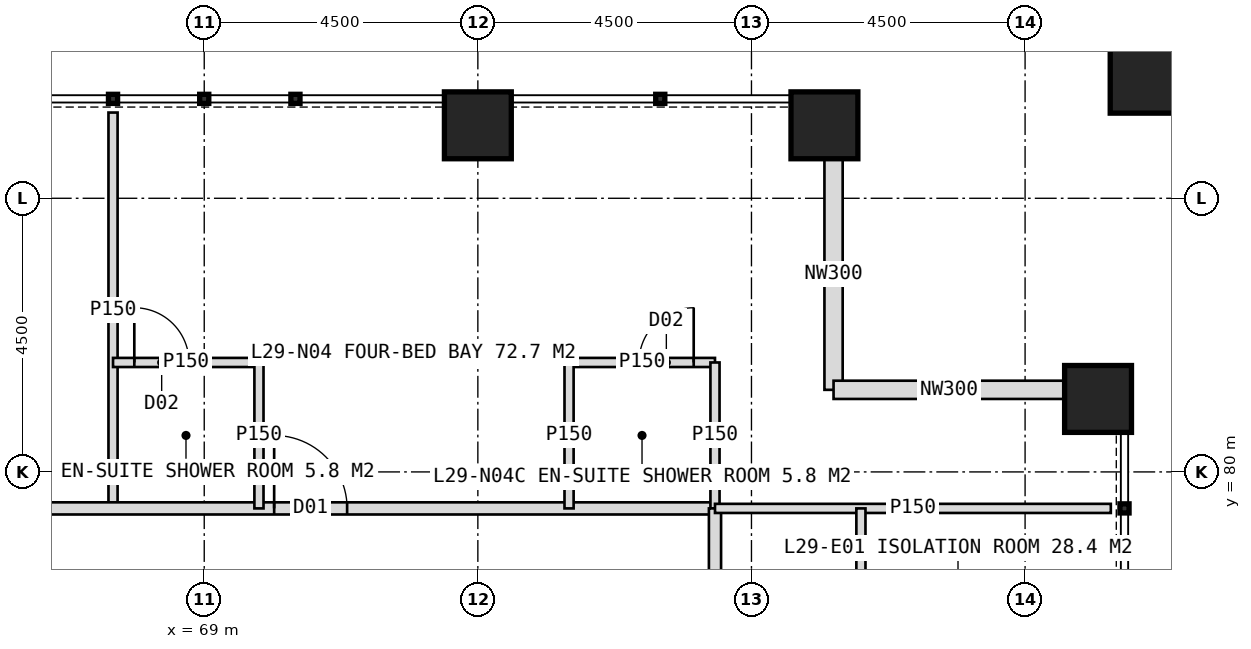
"""IFC4 building model, lengths in metres.
Left out: names, types, materials, properties, quantities, classifications, styles, units other than length and angle.
Written with IfcOpenShell. Run it as: python <this file> out.ifc"""

import sys

from ifc_helpers import new_model, si_unit, direction, frame, frame_2d, origin, origin_2d, place, context, subcontext, project, spatial, rectangle, hollow_rectangle, extrude, element, fill, save


model = new_model("IFC4")
c1 = context("Model", 3, precision=1e-05, world=origin(), true_north=direction((0.0, 1.0)))
c2 = subcontext(c1, "Body", "Model", "MODEL_VIEW")
j1 = project(units=[si_unit("LENGTHUNIT", "METRE"), si_unit("PLANEANGLEUNIT", "RADIAN")], contexts=[c1])
p1 = place(None, origin())
s1 = spatial("IfcSite", under=j1, at=p1, CompositionType="ELEMENT")
p2 = place(p1, origin())
s2 = spatial("IfcBuilding", under=s1, at=p2, CompositionType="ELEMENT")
p3 = place(p2, frame((0.0, 0.0, 124.0)))
s3 = spatial("IfcBuildingStorey", under=s2, at=p3, CompositionType="ELEMENT", Elevation=124.0)
for number, where, z_axis, x_axis in (
    (1, (73.5, 85.7, 0.0), (0.0, 0.0, 1.0), (1.0, 0.0, 0.0)),
    (2, (79.2, 85.7, 0.0), (0.0, 0.0, 1.0), (1.0, 0.0, 0.0)),
    (3, (83.7, 81.2, 0.0), (0.0, 0.0, 1.0), (1.0, 0.0, 0.0)),
):
    element("IfcColumn", number, at=place(p3, frame(where, z_axis=z_axis, x_axis=x_axis)), inside=s3, PredefinedType="COLUMN", context=c2, shape_type="SweptSolid", body=[
        extrude(hollow_rectangle(XDim=1.1, YDim=1.1, WallThickness=0.1, at=origin_2d()), origin(), (0.0, 0.0, 1.0), 4.0),
    ])
p4 = place(p3, frame((84.6, 86.6, 0.0), z_axis=(0.0, 0.0, 1.0), x_axis=(1.0, 0.0, 0.0)))
e4 = element("IfcColumn", 4, at=p4, inside=s3, PredefinedType="COLUMN", context=c2, shape_type="SweptSolid", body=[
    extrude(hollow_rectangle(XDim=1.4, YDim=1.4, WallThickness=0.08, at=origin_2d()), origin(), (0.0, 0.0, 1.0), 4.0),
])
for number, where, z_axis, x_axis in (
    (5, (79.35, 85.15, 0.0), (0.0, 0.0, 1.0), (0.0, -1.0, 0.0)),
    (6, (79.35, 81.35, 0.0), (0.0, 0.0, 1.0), (1.0, 0.0, 0.0)),
):
    element("IfcWall", number, at=place(p3, frame(where, z_axis=z_axis, x_axis=x_axis)), inside=s3, PredefinedType="ELEMENTEDWALL", context=c2, shape_type="SweptSolid", body=[
        extrude(rectangle(XDim=3.8, YDim=0.3, at=frame_2d((1.9, 0.0))), origin(), (0.0, 0.0, 1.0), 4.0),
    ])
p5 = place(p3, frame((67.5, 79.4, 0.0), z_axis=(0.0, 0.0, 1.0), x_axis=(0.0, 1.0, 0.0)))
e7 = element("IfcWall", 7, at=p5, inside=s3, PredefinedType="PARTITIONING", context=c2, shape_type="SweptSolid", body=[
    extrude(rectangle(XDim=6.51, YDim=0.15, at=frame_2d((3.255, 0.0))), origin(), (0.0, 0.0, 1.0), 3.75),
])
p6 = place(p3, frame((42.6, 79.4, 0.0), z_axis=(0.0, 0.0, 1.0), x_axis=(1.0, 0.0, 0.0)))
e8 = element("IfcWall", 8, at=p6, inside=s3, PredefinedType="PARTITIONING", context=c2, shape_type="SweptSolid", body=[
    extrude(rectangle(XDim=34.8, YDim=0.2, at=frame_2d((17.4, 0.0))), origin(), (0.0, 0.0, 1.0), 3.75),
])
p7 = place(p6, frame((2.45, 0.0, 0.0)))
e9 = element("IfcOpeningElement", 9, at=p7, cuts=e8, PredefinedType="OPENING", context=c2, shape_type="SweptSolid", body=[
    extrude(rectangle(XDim=1.2, YDim=2.2, at=frame_2d((0.6, 1.1))), frame((0.0, 0.11, 0.0), z_axis=(0.0, -1.0, 0.0), x_axis=(1.0, 0.0, 0.0)), (0.0, 0.0, 1.0), 0.22),
])
p8 = place(p6, frame((10.15, 0.0, 0.0)))
e10 = element("IfcOpeningElement", 10, at=p8, cuts=e8, PredefinedType="OPENING", context=c2, shape_type="SweptSolid", body=[
    extrude(rectangle(XDim=1.2, YDim=2.2, at=frame_2d((0.6, 1.1))), frame((0.0, 0.11, 0.0), z_axis=(0.0, -1.0, 0.0), x_axis=(1.0, 0.0, 0.0)), (0.0, 0.0, 1.0), 0.22),
])
p9 = place(p6, frame((19.8, 0.0, 0.0)))
e11 = element("IfcOpeningElement", 11, at=p9, cuts=e8, PredefinedType="OPENING", context=c2, shape_type="SweptSolid", body=[
    extrude(rectangle(XDim=1.2, YDim=2.2, at=frame_2d((0.6, 1.1))), frame((0.0, 0.11, 0.0), z_axis=(0.0, -1.0, 0.0), x_axis=(1.0, 0.0, 0.0)), (0.0, 0.0, 1.0), 0.22),
])
p10 = place(p6, frame((27.55, 0.0, 0.0)))
e12 = element("IfcOpeningElement", 12, at=p10, cuts=e8, PredefinedType="OPENING", context=c2, shape_type="SweptSolid", body=[
    extrude(rectangle(XDim=1.2, YDim=2.2, at=frame_2d((0.6, 1.1))), frame((0.0, 0.11, 0.0), z_axis=(0.0, -1.0, 0.0), x_axis=(1.0, 0.0, 0.0)), (0.0, 0.0, 1.0), 0.22),
])
p11 = place(p3, frame((67.5, 81.8, 0.0), z_axis=(0.0, 0.0, 1.0), x_axis=(1.0, 0.0, 0.0)))
e13 = element("IfcWall", 13, at=p11, inside=s3, PredefinedType="PARTITIONING", context=c2, shape_type="SweptSolid", body=[
    extrude(rectangle(XDim=2.4, YDim=0.15, at=frame_2d((1.2, 0.0))), origin(), (0.0, 0.0, 1.0), 3.75),
])
p12 = place(p11, frame((0.35, 0.0, 0.0)))
e14 = element("IfcOpeningElement", 14, at=p12, cuts=e13, PredefinedType="OPENING", context=c2, shape_type="SweptSolid", body=[
    extrude(rectangle(XDim=0.9, YDim=2.1, at=frame_2d((0.45, 1.05))), frame((0.0, 0.085, 0.0), z_axis=(0.0, -1.0, 0.0), x_axis=(1.0, 0.0, 0.0)), (0.0, 0.0, 1.0), 0.17),
])
p13 = place(p3, frame((69.9, 79.4, 0.0), z_axis=(0.0, 0.0, 1.0), x_axis=(0.0, 1.0, 0.0)))
e15 = element("IfcWall", 15, at=p13, inside=s3, PredefinedType="PARTITIONING", context=c2, shape_type="SweptSolid", body=[
    extrude(rectangle(XDim=2.4, YDim=0.15, at=frame_2d((1.2, 0.0))), origin(), (0.0, 0.0, 1.0), 3.75),
])
p14 = place(p3, frame((75.0, 81.8, 0.0), z_axis=(0.0, 0.0, 1.0), x_axis=(1.0, 0.0, 0.0)))
e16 = element("IfcWall", 16, at=p14, inside=s3, PredefinedType="PARTITIONING", context=c2, shape_type="SweptSolid", body=[
    extrude(rectangle(XDim=2.4, YDim=0.15, at=frame_2d((1.2, 0.0))), origin(), (0.0, 0.0, 1.0), 3.75),
])
p15 = place(p14, frame((1.15, 0.0, 0.0)))
e17 = element("IfcOpeningElement", 17, at=p15, cuts=e16, PredefinedType="OPENING", context=c2, shape_type="SweptSolid", body=[
    extrude(rectangle(XDim=0.9, YDim=2.1, at=frame_2d((0.45, 1.05))), frame((0.0, 0.085, 0.0), z_axis=(0.0, -1.0, 0.0), x_axis=(1.0, 0.0, 0.0)), (0.0, 0.0, 1.0), 0.17),
])
for number, where, z_axis, x_axis in (
    (18, (75.0, 79.4, 0.0), (0.0, 0.0, 1.0), (0.0, 1.0, 0.0)),
    (19, (77.4, 79.4, 0.0), (0.0, 0.0, 1.0), (0.0, 1.0, 0.0)),
):
    element("IfcWall", number, at=place(p3, frame(where, z_axis=z_axis, x_axis=x_axis)), inside=s3, PredefinedType="PARTITIONING", context=c2, shape_type="SweptSolid", body=[
        extrude(rectangle(XDim=2.4, YDim=0.15, at=frame_2d((1.2, 0.0))), origin(), (0.0, 0.0, 1.0), 3.75),
    ])
p16 = place(p3, frame((77.4, 79.4, 0.0), z_axis=(0.0, 0.0, 1.0), x_axis=(0.0, -1.0, 0.0)))
e20 = element("IfcWall", 20, at=p16, inside=s3, PredefinedType="PARTITIONING", context=c2, shape_type="SweptSolid", body=[
    extrude(rectangle(XDim=34.8, YDim=0.2, at=frame_2d((17.4, 0.0))), origin(), (0.0, 0.0, 1.0), 3.75),
])
p17 = place(p16, frame((2.45, 0.0, 0.0)))
e21 = element("IfcOpeningElement", 21, at=p17, cuts=e20, PredefinedType="OPENING", context=c2, shape_type="SweptSolid", body=[
    extrude(rectangle(XDim=1.2, YDim=2.2, at=frame_2d((0.6, 1.1))), frame((0.0, 0.11, 0.0), z_axis=(0.0, -1.0, 0.0), x_axis=(1.0, 0.0, 0.0)), (0.0, 0.0, 1.0), 0.22),
])
p18 = place(p16, frame((10.15, 0.0, 0.0)))
e22 = element("IfcOpeningElement", 22, at=p18, cuts=e20, PredefinedType="OPENING", context=c2, shape_type="SweptSolid", body=[
    extrude(rectangle(XDim=1.2, YDim=2.2, at=frame_2d((0.6, 1.1))), frame((0.0, 0.11, 0.0), z_axis=(0.0, -1.0, 0.0), x_axis=(1.0, 0.0, 0.0)), (0.0, 0.0, 1.0), 0.22),
])
p19 = place(p16, frame((19.55, 0.0, 0.0)))
e23 = element("IfcOpeningElement", 23, at=p19, cuts=e20, PredefinedType="OPENING", context=c2, shape_type="SweptSolid", body=[
    extrude(rectangle(XDim=1.2, YDim=2.2, at=frame_2d((0.6, 1.1))), frame((0.0, 0.11, 0.0), z_axis=(0.0, -1.0, 0.0), x_axis=(1.0, 0.0, 0.0)), (0.0, 0.0, 1.0), 0.22),
])
p20 = place(p16, frame((26.05, 0.0, 0.0)))
e24 = element("IfcOpeningElement", 24, at=p20, cuts=e20, PredefinedType="OPENING", context=c2, shape_type="SweptSolid", body=[
    extrude(rectangle(XDim=1.2, YDim=2.2, at=frame_2d((0.6, 1.1))), frame((0.0, 0.11, 0.0), z_axis=(0.0, -1.0, 0.0), x_axis=(1.0, 0.0, 0.0)), (0.0, 0.0, 1.0), 0.22),
])
p21 = place(p3, frame((77.4, 79.4, 0.0), z_axis=(0.0, 0.0, 1.0), x_axis=(1.0, 0.0, 0.0)))
e25 = element("IfcWall", 25, at=p21, inside=s3, PredefinedType="PARTITIONING", context=c2, shape_type="SweptSolid", body=[
    extrude(rectangle(XDim=6.51, YDim=0.15, at=frame_2d((3.255, 0.0))), origin(), (0.0, 0.0, 1.0), 3.75),
])
p22 = place(p3, frame((79.8, 79.4, 0.0), z_axis=(0.0, 0.0, 1.0), x_axis=(0.0, -1.0, 0.0)))
e26 = element("IfcWall", 26, at=p22, inside=s3, PredefinedType="PARTITIONING", context=c2, shape_type="SweptSolid", body=[
    extrude(rectangle(XDim=3.9, YDim=0.15, at=frame_2d((1.95, 0.0))), origin(), (0.0, 0.0, 1.0), 3.75),
])
p23 = place(p22, frame((2.45, 0.0, 0.0)))
e27 = element("IfcOpeningElement", 27, at=p23, cuts=e26, PredefinedType="OPENING", context=c2, shape_type="SweptSolid", body=[
    extrude(rectangle(XDim=1.2, YDim=2.2, at=frame_2d((0.6, 1.1))), frame((0.0, 0.085, 0.0), z_axis=(0.0, -1.0, 0.0), x_axis=(1.0, 0.0, 0.0)), (0.0, 0.0, 1.0), 0.17),
])
p24 = place(p10, origin())
e28 = element("IfcDoor", 28, at=p24, inside=s3, OperationType="SINGLE_SWING_LEFT", PredefinedType="DOOR", context=c2, shape_type="SweptSolid", body=[
    extrude(rectangle(XDim=1.2, YDim=2.2, at=frame_2d((0.6, 1.1))), frame((0.0, 0.025, 0.0), z_axis=(0.0, -1.0, 0.0), x_axis=(1.0, 0.0, 0.0)), (0.0, 0.0, 1.0), 0.05),
])
fill(e12, e28)
p25 = place(p12, origin())
e29 = element("IfcDoor", 29, at=p25, inside=s3, OperationType="SINGLE_SWING_LEFT", PredefinedType="DOOR", context=c2, shape_type="SweptSolid", body=[
    extrude(rectangle(XDim=0.9, YDim=2.1, at=frame_2d((0.45, 1.05))), frame((0.0, 0.025, 0.0), z_axis=(0.0, -1.0, 0.0), x_axis=(1.0, 0.0, 0.0)), (0.0, 0.0, 1.0), 0.05),
])
fill(e14, e29)
p26 = place(p15, origin())
e30 = element("IfcDoor", 30, at=p26, inside=s3, OperationType="SINGLE_SWING_RIGHT", PredefinedType="DOOR", context=c2, shape_type="SweptSolid", body=[
    extrude(rectangle(XDim=0.9, YDim=2.1, at=frame_2d((0.45, 1.05))), frame((0.0, 0.025, 0.0), z_axis=(0.0, -1.0, 0.0), x_axis=(1.0, 0.0, 0.0)), (0.0, 0.0, 1.0), 0.05),
])
fill(e17, e30)
save(model, sys.argv[1])
